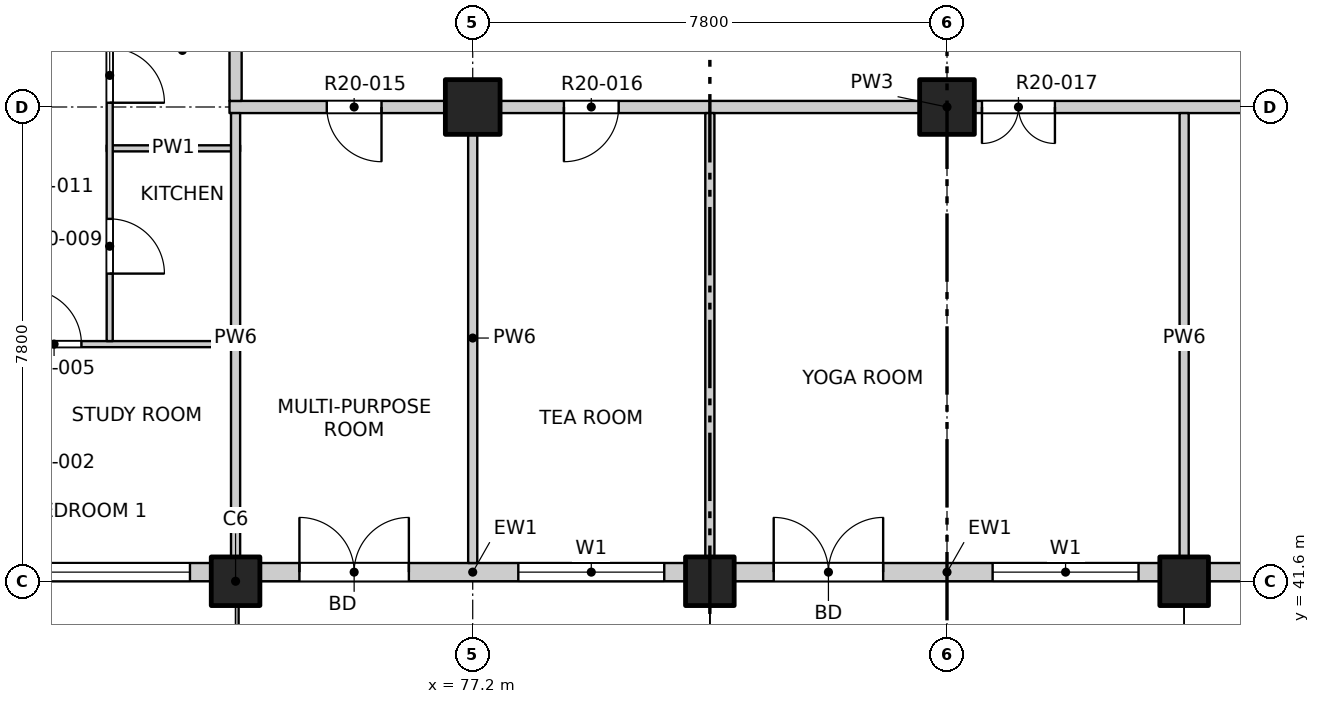
"""IFC4 building model, lengths in metres.
Left out: names, types, materials, properties, quantities, classifications, styles, units other than length and angle.
Written with IfcOpenShell. Run it as: python <this file> out.ifc"""

import sys

from ifc_helpers import new_model, si_unit, direction, frame, frame_2d, origin, origin_2d, place, context, subcontext, project, spatial, rectangle, extrude, element, fill, save


model = new_model("IFC4")
c1 = context("Model", 3, precision=1e-05, world=origin(), true_north=direction((0.0, 1.0)))
c2 = subcontext(c1, "Body", "Model", "MODEL_VIEW")
j1 = project(units=[si_unit("LENGTHUNIT", "METRE"), si_unit("PLANEANGLEUNIT", "RADIAN")], contexts=[c1])
p1 = place(None, origin())
s1 = spatial("IfcSite", under=j1, at=p1, CompositionType="ELEMENT")
p2 = place(p1, origin())
s2 = spatial("IfcBuilding", under=s1, at=p2, CompositionType="ELEMENT")
p3 = place(p2, frame((0.0, 0.0, 204.1)))
s3 = spatial("IfcBuildingStorey", under=s2, at=p3, CompositionType="ELEMENT", Elevation=204.1)
for number, where, z_axis, x_axis in (
    (1, (73.3, 41.6, -0.25), (0.0, 0.0, 1.0), (1.0, 0.0, 0.0)),
    (2, (81.1, 41.6, -0.25), (0.0, 0.0, 1.0), (1.0, 0.0, 0.0)),
    (3, (88.9, 41.6, -0.25), (0.0, 0.0, 1.0), (1.0, 0.0, 0.0)),
):
    element("IfcColumn", number, at=place(p3, frame(where, z_axis=z_axis, x_axis=x_axis)), inside=s3, PredefinedType="COLUMN", context=c2, shape_type="SweptSolid", body=[
        extrude(rectangle(XDim=0.8, YDim=0.8, at=origin_2d()), origin(), (0.0, 0.0, 1.0), 3.4),
    ])
for number, where, z_axis, x_axis in (
    (4, (77.2, 49.4, -0.25), (0.0, 0.0, 1.0), (1.0, 0.0, 0.0)),
    (5, (85.0, 49.4, -0.25), (0.0, 0.0, 1.0), (1.0, 0.0, 0.0)),
):
    element("IfcColumn", number, at=place(p3, frame(where, z_axis=z_axis, x_axis=x_axis)), inside=s3, PredefinedType="COLUMN", context=c2, shape_type="SweptSolid", body=[
        extrude(rectangle(XDim=0.9, YDim=0.9, at=origin_2d()), origin(), (0.0, 0.0, 1.0), 3.4),
    ])
p4 = place(p3, frame((65.5, 41.75, 0.0), z_axis=(0.0, 0.0, 1.0), x_axis=(1.0, 0.0, 0.0)))
e6 = element("IfcWall", 6, at=p4, inside=s3, PredefinedType="SOLIDWALL", context=c2, shape_type="SweptSolid", body=[
    extrude(rectangle(XDim=7.4, YDim=0.3, at=frame_2d((3.7, 0.0))), origin(), (0.0, 0.0, 1.0), 2.7),
])
p5 = place(p4, frame((0.75, 0.0, 0.9)))
e7 = element("IfcOpeningElement", 7, at=p5, cuts=e6, PredefinedType="OPENING", context=c2, shape_type="SweptSolid", body=[
    extrude(rectangle(XDim=2.4, YDim=1.8, at=frame_2d((1.2, 0.9))), frame((0.0, 0.16, 0.0), z_axis=(0.0, -1.0, 0.0), x_axis=(1.0, 0.0, 0.0)), (0.0, 0.0, 1.0), 0.32),
])
p6 = place(p4, frame((4.65, 0.0, 0.9)))
e8 = element("IfcOpeningElement", 8, at=p6, cuts=e6, PredefinedType="OPENING", context=c2, shape_type="SweptSolid", body=[
    extrude(rectangle(XDim=2.4, YDim=1.8, at=frame_2d((1.2, 0.9))), frame((0.0, 0.16, 0.0), z_axis=(0.0, -1.0, 0.0), x_axis=(1.0, 0.0, 0.0)), (0.0, 0.0, 1.0), 0.32),
])
p7 = place(p3, frame((73.7, 41.75, 0.0), z_axis=(0.0, 0.0, 1.0), x_axis=(1.0, 0.0, 0.0)))
e9 = element("IfcWall", 9, at=p7, inside=s3, PredefinedType="SOLIDWALL", context=c2, shape_type="SweptSolid", body=[
    extrude(rectangle(XDim=7.0, YDim=0.3, at=frame_2d((3.5, 0.0))), origin(), (0.0, 0.0, 1.0), 2.7),
])
p8 = place(p7, frame((0.65, 0.0, 0.0)))
e10 = element("IfcOpeningElement", 10, at=p8, cuts=e9, PredefinedType="OPENING", context=c2, shape_type="SweptSolid", body=[
    extrude(rectangle(XDim=1.8, YDim=2.4, at=frame_2d((0.9, 1.2))), frame((0.0, 0.16, 0.0), z_axis=(0.0, -1.0, 0.0), x_axis=(1.0, 0.0, 0.0)), (0.0, 0.0, 1.0), 0.32),
])
p9 = place(p7, frame((4.25, 0.0, 0.9)))
e11 = element("IfcOpeningElement", 11, at=p9, cuts=e9, PredefinedType="OPENING", context=c2, shape_type="SweptSolid", body=[
    extrude(rectangle(XDim=2.4, YDim=1.8, at=frame_2d((1.2, 0.9))), frame((0.0, 0.16, 0.0), z_axis=(0.0, -1.0, 0.0), x_axis=(1.0, 0.0, 0.0)), (0.0, 0.0, 1.0), 0.32),
])
p10 = place(p3, frame((81.5, 41.75, 0.0), z_axis=(0.0, 0.0, 1.0), x_axis=(1.0, 0.0, 0.0)))
e12 = element("IfcWall", 12, at=p10, inside=s3, PredefinedType="SOLIDWALL", context=c2, shape_type="SweptSolid", body=[
    extrude(rectangle(XDim=7.0, YDim=0.3, at=frame_2d((3.5, 0.0))), origin(), (0.0, 0.0, 1.0), 2.7),
])
p11 = place(p10, frame((0.65, 0.0, 0.0)))
e13 = element("IfcOpeningElement", 13, at=p11, cuts=e12, PredefinedType="OPENING", context=c2, shape_type="SweptSolid", body=[
    extrude(rectangle(XDim=1.8, YDim=2.4, at=frame_2d((0.9, 1.2))), frame((0.0, 0.16, 0.0), z_axis=(0.0, -1.0, 0.0), x_axis=(1.0, 0.0, 0.0)), (0.0, 0.0, 1.0), 0.32),
])
p12 = place(p10, frame((4.25, 0.0, 0.9)))
e14 = element("IfcOpeningElement", 14, at=p12, cuts=e12, PredefinedType="OPENING", context=c2, shape_type="SweptSolid", body=[
    extrude(rectangle(XDim=2.4, YDim=1.8, at=frame_2d((1.2, 0.9))), frame((0.0, 0.16, 0.0), z_axis=(0.0, -1.0, 0.0), x_axis=(1.0, 0.0, 0.0)), (0.0, 0.0, 1.0), 0.32),
])
p13 = place(p3, frame((89.3, 41.75, 0.0), z_axis=(0.0, 0.0, 1.0), x_axis=(1.0, 0.0, 0.0)))
e15 = element("IfcWall", 15, at=p13, inside=s3, PredefinedType="SOLIDWALL", context=c2, shape_type="SweptSolid", body=[
    extrude(rectangle(XDim=7.0, YDim=0.3, at=frame_2d((3.5, 0.0))), origin(), (0.0, 0.0, 1.0), 2.7),
])
p14 = place(p13, frame((0.65, 0.0, 0.0)))
e16 = element("IfcOpeningElement", 16, at=p14, cuts=e15, PredefinedType="OPENING", context=c2, shape_type="SweptSolid", body=[
    extrude(rectangle(XDim=1.8, YDim=2.4, at=frame_2d((0.9, 1.2))), frame((0.0, 0.16, 0.0), z_axis=(0.0, -1.0, 0.0), x_axis=(1.0, 0.0, 0.0)), (0.0, 0.0, 1.0), 0.32),
])
p15 = place(p13, frame((4.25, 0.0, 0.9)))
e17 = element("IfcOpeningElement", 17, at=p15, cuts=e15, PredefinedType="OPENING", context=c2, shape_type="SweptSolid", body=[
    extrude(rectangle(XDim=2.4, YDim=1.8, at=frame_2d((1.2, 0.9))), frame((0.0, 0.16, 0.0), z_axis=(0.0, -1.0, 0.0), x_axis=(1.0, 0.0, 0.0)), (0.0, 0.0, 1.0), 0.32),
])
p16 = place(p3, frame((61.9, 45.5, 0.0), z_axis=(0.0, 0.0, 1.0), x_axis=(1.0, 0.0, 0.0)))
e18 = element("IfcWall", 18, at=p16, inside=s3, PredefinedType="PARTITIONING", context=c2, shape_type="SweptSolid", body=[
    extrude(rectangle(XDim=11.475, YDim=0.1, at=frame_2d((5.737, 0.0))), origin(), (0.0, 0.0, 1.0), 3.15),
])
p17 = place(p16, frame((7.965, 0.0, 0.0)))
e19 = element("IfcOpeningElement", 19, at=p17, cuts=e18, PredefinedType="OPENING", context=c2, shape_type="SweptSolid", body=[
    extrude(rectangle(XDim=0.9, YDim=2.1, at=frame_2d((0.45, 1.05))), frame((0.0, 0.06, 0.0), z_axis=(0.0, -1.0, 0.0), x_axis=(1.0, 0.0, 0.0)), (0.0, 0.0, 1.0), 0.12),
])
p18 = place(p3, frame((71.18, 48.72, 0.0), z_axis=(0.0, 0.0, 1.0), x_axis=(1.0, 0.0, 0.0)))
e20 = element("IfcWall", 20, at=p18, inside=s3, PredefinedType="PARTITIONING", context=c2, shape_type="SweptSolid", body=[
    extrude(rectangle(XDim=2.195, YDim=0.1, at=frame_2d((1.097, 0.0))), origin(), (0.0, 0.0, 1.0), 3.15),
])
p19 = place(p3, frame((73.2, 49.4, 0.0), z_axis=(0.0, 0.0, 1.0), x_axis=(1.0, 0.0, 0.0)))
e21 = element("IfcWall", 21, at=p19, inside=s3, PredefinedType="PARTITIONING", context=c2, shape_type="SweptSolid", body=[
    extrude(rectangle(XDim=23.6, YDim=0.2, at=frame_2d((11.8, 0.0))), origin(), (0.0, 0.0, 1.0), 3.15),
])
p20 = place(p19, frame((1.6, 0.0, 0.0)))
e22 = element("IfcOpeningElement", 22, at=p20, cuts=e21, PredefinedType="OPENING", context=c2, shape_type="SweptSolid", body=[
    extrude(rectangle(XDim=0.9, YDim=2.1, at=frame_2d((0.45, 1.05))), frame((0.0, 0.11, 0.0), z_axis=(0.0, -1.0, 0.0), x_axis=(1.0, 0.0, 0.0)), (0.0, 0.0, 1.0), 0.22),
])
p21 = place(p19, frame((5.5, 0.0, 0.0)))
e23 = element("IfcOpeningElement", 23, at=p21, cuts=e21, PredefinedType="OPENING", context=c2, shape_type="SweptSolid", body=[
    extrude(rectangle(XDim=0.9, YDim=2.1, at=frame_2d((0.45, 1.05))), frame((0.0, 0.11, 0.0), z_axis=(0.0, -1.0, 0.0), x_axis=(1.0, 0.0, 0.0)), (0.0, 0.0, 1.0), 0.22),
])
p22 = place(p19, frame((12.375, 0.0, 0.0)))
e24 = element("IfcOpeningElement", 24, at=p22, cuts=e21, PredefinedType="OPENING", context=c2, shape_type="SweptSolid", body=[
    extrude(rectangle(XDim=1.2, YDim=2.1, at=frame_2d((0.6, 1.05))), frame((0.0, 0.11, 0.0), z_axis=(0.0, -1.0, 0.0), x_axis=(1.0, 0.0, 0.0)), (0.0, 0.0, 1.0), 0.22),
])
p23 = place(p19, frame((20.15, 0.0, 0.0)))
e25 = element("IfcOpeningElement", 25, at=p23, cuts=e21, PredefinedType="OPENING", context=c2, shape_type="SweptSolid", body=[
    extrude(rectangle(XDim=1.2, YDim=2.1, at=frame_2d((0.6, 1.05))), frame((0.0, 0.11, 0.0), z_axis=(0.0, -1.0, 0.0), x_axis=(1.0, 0.0, 0.0)), (0.0, 0.0, 1.0), 0.22),
])
p24 = place(p3, frame((71.23, 45.55, 0.0), z_axis=(0.0, 0.0, 1.0), x_axis=(0.0, 1.0, 0.0)))
e26 = element("IfcWall", 26, at=p24, inside=s3, PredefinedType="PARTITIONING", context=c2, shape_type="SweptSolid", body=[
    extrude(rectangle(XDim=8.3, YDim=0.1, at=frame_2d((4.15, 0.0))), origin(), (0.0, 0.0, 1.0), 3.15),
])
p25 = place(p24, frame((1.11, 0.0, 0.0)))
e27 = element("IfcOpeningElement", 27, at=p25, cuts=e26, PredefinedType="OPENING", context=c2, shape_type="SweptSolid", body=[
    extrude(rectangle(XDim=0.9, YDim=2.1, at=frame_2d((0.45, 1.05))), frame((0.0, 0.06, 0.0), z_axis=(0.0, -1.0, 0.0), x_axis=(1.0, 0.0, 0.0)), (0.0, 0.0, 1.0), 0.12),
])
p26 = place(p24, frame((3.92, 0.0, 0.0)))
e28 = element("IfcOpeningElement", 28, at=p26, cuts=e26, PredefinedType="OPENING", context=c2, shape_type="SweptSolid", body=[
    extrude(rectangle(XDim=0.9, YDim=2.1, at=frame_2d((0.45, 1.05))), frame((0.0, 0.06, 0.0), z_axis=(0.0, -1.0, 0.0), x_axis=(1.0, 0.0, 0.0)), (0.0, 0.0, 1.0), 0.12),
])
p27 = place(p24, frame((6.56, 0.0, 0.0)))
e29 = element("IfcOpeningElement", 29, at=p27, cuts=e26, PredefinedType="OPENING", context=c2, shape_type="SweptSolid", body=[
    extrude(rectangle(XDim=0.8, YDim=2.1, at=frame_2d((0.4, 1.05))), frame((0.0, 0.06, 0.0), z_axis=(0.0, -1.0, 0.0), x_axis=(1.0, 0.0, 0.0)), (0.0, 0.0, 1.0), 0.12),
])
p28 = place(p3, frame((73.3, 41.9, 0.0), z_axis=(0.0, 0.0, 1.0), x_axis=(0.0, 1.0, 0.0)))
e30 = element("IfcWall", 30, at=p28, inside=s3, PredefinedType="PARTITIONING", context=c2, shape_type="SweptSolid", body=[
    extrude(rectangle(XDim=7.4, YDim=0.15, at=frame_2d((3.7, 0.0))), origin(), (0.0, 0.0, 1.0), 3.15),
])
p29 = place(p3, frame((73.3, 49.5, 0.0), z_axis=(0.0, 0.0, 1.0), x_axis=(0.0, 1.0, 0.0)))
e31 = element("IfcWall", 31, at=p29, inside=s3, PredefinedType="PARTITIONING", context=c2, shape_type="SweptSolid", body=[
    extrude(rectangle(XDim=34.9, YDim=0.2, at=frame_2d((17.45, 0.0))), origin(), (0.0, 0.0, 1.0), 3.15),
])
p30 = place(p29, frame((3.225, 0.0, 0.0)))
e32 = element("IfcOpeningElement", 32, at=p30, cuts=e31, PredefinedType="OPENING", context=c2, shape_type="SweptSolid", body=[
    extrude(rectangle(XDim=1.0, YDim=2.1, at=frame_2d((0.5, 1.05))), frame((0.0, 0.11, 0.0), z_axis=(0.0, -1.0, 0.0), x_axis=(1.0, 0.0, 0.0)), (0.0, 0.0, 1.0), 0.22),
])
p31 = place(p29, frame((25.125, 0.0, 0.0)))
e33 = element("IfcOpeningElement", 33, at=p31, cuts=e31, PredefinedType="OPENING", context=c2, shape_type="SweptSolid", body=[
    extrude(rectangle(XDim=1.0, YDim=2.1, at=frame_2d((0.5, 1.05))), frame((0.0, 0.11, 0.0), z_axis=(0.0, -1.0, 0.0), x_axis=(1.0, 0.0, 0.0)), (0.0, 0.0, 1.0), 0.22),
])
p32 = place(p29, frame((31.475, 0.0, 0.0)))
e34 = element("IfcOpeningElement", 34, at=p32, cuts=e31, PredefinedType="OPENING", context=c2, shape_type="SweptSolid", body=[
    extrude(rectangle(XDim=1.0, YDim=2.1, at=frame_2d((0.5, 1.05))), frame((0.0, 0.11, 0.0), z_axis=(0.0, -1.0, 0.0), x_axis=(1.0, 0.0, 0.0)), (0.0, 0.0, 1.0), 0.22),
])
p33 = place(p3, frame((77.2, 41.9, 0.0), z_axis=(0.0, 0.0, 1.0), x_axis=(0.0, 1.0, 0.0)))
e35 = element("IfcWall", 35, at=p33, inside=s3, PredefinedType="PARTITIONING", context=c2, shape_type="SweptSolid", body=[
    extrude(rectangle(XDim=7.4, YDim=0.15, at=frame_2d((3.7, 0.0))), origin(), (0.0, 0.0, 1.0), 3.15),
])
for number, where, z_axis, x_axis in (
    (36, (81.1, 41.9, 0.0), (0.0, 0.0, 1.0), (0.0, 1.0, 0.0)),
    (37, (88.9, 41.9, 0.0), (0.0, 0.0, 1.0), (0.0, 1.0, 0.0)),
):
    element("IfcWall", number, at=place(p3, frame(where, z_axis=z_axis, x_axis=x_axis)), inside=s3, PredefinedType="PARTITIONING", context=c2, shape_type="SweptSolid", body=[
        extrude(rectangle(XDim=7.4, YDim=0.15, at=frame_2d((3.7, 0.0))), origin(), (0.0, 0.0, 1.0), 2.55),
    ])
p34 = place(p6, origin())
e38 = element("IfcWindow", 38, at=p34, inside=s3, PartitioningType="DOUBLE_PANEL_VERTICAL", PredefinedType="WINDOW", context=c2, shape_type="SweptSolid", body=[
    extrude(rectangle(XDim=2.4, YDim=1.8, at=frame_2d((1.2, 0.9))), frame((0.0, 0.03, 0.0), z_axis=(0.0, -1.0, 0.0), x_axis=(1.0, 0.0, 0.0)), (0.0, 0.0, 1.0), 0.06),
])
fill(e8, e38)
p35 = place(p8, origin())
e39 = element("IfcDoor", 39, at=p35, inside=s3, OperationType="DOUBLE_DOOR_SINGLE_SWING", PredefinedType="DOOR", context=c2, shape_type="SweptSolid", body=[
    extrude(rectangle(XDim=1.8, YDim=2.4, at=frame_2d((0.9, 1.2))), frame((0.0, 0.025, 0.0), z_axis=(0.0, -1.0, 0.0), x_axis=(1.0, 0.0, 0.0)), (0.0, 0.0, 1.0), 0.05),
])
fill(e10, e39)
p36 = place(p9, origin())
e40 = element("IfcWindow", 40, at=p36, inside=s3, PartitioningType="DOUBLE_PANEL_VERTICAL", PredefinedType="WINDOW", context=c2, shape_type="SweptSolid", body=[
    extrude(rectangle(XDim=2.4, YDim=1.8, at=frame_2d((1.2, 0.9))), frame((0.0, 0.03, 0.0), z_axis=(0.0, -1.0, 0.0), x_axis=(1.0, 0.0, 0.0)), (0.0, 0.0, 1.0), 0.06),
])
fill(e11, e40)
p37 = place(p11, origin())
e41 = element("IfcDoor", 41, at=p37, inside=s3, OperationType="DOUBLE_DOOR_SINGLE_SWING", PredefinedType="DOOR", context=c2, shape_type="SweptSolid", body=[
    extrude(rectangle(XDim=1.8, YDim=2.4, at=frame_2d((0.9, 1.2))), frame((0.0, 0.025, 0.0), z_axis=(0.0, -1.0, 0.0), x_axis=(1.0, 0.0, 0.0)), (0.0, 0.0, 1.0), 0.05),
])
fill(e13, e41)
p38 = place(p12, origin())
e42 = element("IfcWindow", 42, at=p38, inside=s3, PartitioningType="DOUBLE_PANEL_VERTICAL", PredefinedType="WINDOW", context=c2, shape_type="SweptSolid", body=[
    extrude(rectangle(XDim=2.4, YDim=1.8, at=frame_2d((1.2, 0.9))), frame((0.0, 0.03, 0.0), z_axis=(0.0, -1.0, 0.0), x_axis=(1.0, 0.0, 0.0)), (0.0, 0.0, 1.0), 0.06),
])
fill(e14, e42)
p39 = place(p17, origin())
e43 = element("IfcDoor", 43, at=p39, inside=s3, OperationType="SINGLE_SWING_LEFT", PredefinedType="DOOR", context=c2, shape_type="SweptSolid", body=[
    extrude(rectangle(XDim=0.9, YDim=2.1, at=frame_2d((0.45, 1.05))), frame((0.0, 0.025, 0.0), z_axis=(0.0, -1.0, 0.0), x_axis=(1.0, 0.0, 0.0)), (0.0, 0.0, 1.0), 0.05),
])
fill(e19, e43)
p40 = place(p25, origin())
e44 = element("IfcDoor", 44, at=p40, inside=s3, OperationType="SINGLE_SWING_RIGHT", PredefinedType="DOOR", context=c2, shape_type="SweptSolid", body=[
    extrude(rectangle(XDim=0.9, YDim=2.1, at=frame_2d((0.45, 1.05))), frame((0.0, 0.025, 0.0), z_axis=(0.0, -1.0, 0.0), x_axis=(1.0, 0.0, 0.0)), (0.0, 0.0, 1.0), 0.05),
])
fill(e27, e44)
p41 = place(p20, origin())
e45 = element("IfcDoor", 45, at=p41, inside=s3, OperationType="SINGLE_SWING_LEFT", PredefinedType="DOOR", context=c2, shape_type="SweptSolid", body=[
    extrude(rectangle(XDim=0.9, YDim=2.1, at=frame_2d((0.45, 1.05))), frame((0.0, 0.025, 0.0), z_axis=(0.0, -1.0, 0.0), x_axis=(1.0, 0.0, 0.0)), (0.0, 0.0, 1.0), 0.05),
])
fill(e22, e45)
p42 = place(p21, origin())
e46 = element("IfcDoor", 46, at=p42, inside=s3, OperationType="SINGLE_SWING_RIGHT", PredefinedType="DOOR", context=c2, shape_type="SweptSolid", body=[
    extrude(rectangle(XDim=0.9, YDim=2.1, at=frame_2d((0.45, 1.05))), frame((0.0, 0.025, 0.0), z_axis=(0.0, -1.0, 0.0), x_axis=(1.0, 0.0, 0.0)), (0.0, 0.0, 1.0), 0.05),
])
fill(e23, e46)
p43 = place(p22, origin())
e47 = element("IfcDoor", 47, at=p43, inside=s3, OperationType="DOUBLE_DOOR_SINGLE_SWING", PredefinedType="DOOR", context=c2, shape_type="SweptSolid", body=[
    extrude(rectangle(XDim=1.2, YDim=2.1, at=frame_2d((0.6, 1.05))), frame((0.0, 0.025, 0.0), z_axis=(0.0, -1.0, 0.0), x_axis=(1.0, 0.0, 0.0)), (0.0, 0.0, 1.0), 0.05),
])
fill(e24, e47)
p44 = place(p26, origin())
e48 = element("IfcDoor", 48, at=p44, inside=s3, OperationType="SINGLE_SWING_RIGHT", PredefinedType="DOOR", context=c2, shape_type="SweptSolid", body=[
    extrude(rectangle(XDim=0.9, YDim=2.1, at=frame_2d((0.45, 1.05))), frame((0.0, 0.025, 0.0), z_axis=(0.0, -1.0, 0.0), x_axis=(1.0, 0.0, 0.0)), (0.0, 0.0, 1.0), 0.05),
])
fill(e28, e48)
save(model, sys.argv[1])
